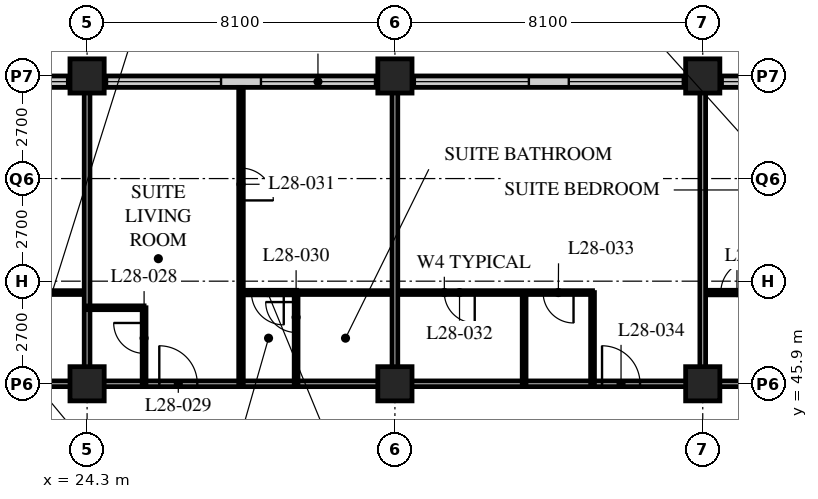
"""IFC4 building model, lengths in metres.
Left out: names, types, materials, properties, quantities, classifications, styles, units other than length and angle.
Written with IfcOpenShell. Run it as: python <this file> out.ifc"""

import sys

from ifc_helpers import new_model, si_unit, direction, frame, frame_2d, origin, origin_2d, place, context, subcontext, project, spatial, rectangle, hollow_rectangle, extrude, element, fill, save


model = new_model("IFC4")
c1 = context("Model", 3, precision=1e-05, world=origin(), true_north=direction((0.0, 1.0)))
c2 = subcontext(c1, "Body", "Model", "MODEL_VIEW")
j1 = project(units=[si_unit("LENGTHUNIT", "METRE"), si_unit("PLANEANGLEUNIT", "RADIAN")], contexts=[c1])
p1 = place(None, origin())
s1 = spatial("IfcSite", under=j1, at=p1, CompositionType="ELEMENT")
p2 = place(p1, origin())
s2 = spatial("IfcBuilding", under=s1, at=p2, CompositionType="ELEMENT")
p3 = place(p2, frame((0.0, 0.0, 113.6)))
s3 = spatial("IfcBuildingStorey", under=s2, at=p3, CompositionType="ELEMENT", Elevation=113.6)
for number, where, z_axis, x_axis in (
    (1, (24.3, 45.9, 0.0), (0.0, 0.0, 1.0), (1.0, 0.0, 0.0)),
    (2, (24.3, 54.0, 0.0), (0.0, 0.0, 1.0), (1.0, 0.0, 0.0)),
    (3, (32.4, 45.9, 0.0), (0.0, 0.0, 1.0), (1.0, 0.0, 0.0)),
    (4, (32.4, 54.0, 0.0), (0.0, 0.0, 1.0), (1.0, 0.0, 0.0)),
    (5, (40.5, 45.9, 0.0), (0.0, 0.0, 1.0), (1.0, 0.0, 0.0)),
    (6, (40.5, 54.0, 0.0), (0.0, 0.0, 1.0), (1.0, 0.0, 0.0)),
):
    element("IfcColumn", number, at=place(p3, frame(where, z_axis=z_axis, x_axis=x_axis)), inside=s3, PredefinedType="COLUMN", context=c2, shape_type="SweptSolid", body=[
        extrude(hollow_rectangle(XDim=0.9, YDim=0.9, WallThickness=0.09, at=origin_2d()), origin(), (0.0, 0.0, 1.0), 3.4),
    ])
p4 = place(p3, frame((48.3, 53.85, 0.0), z_axis=(0.0, 0.0, 1.0), x_axis=(-1.0, 0.0, 0.0)))
e7 = element("IfcWall", 7, at=p4, inside=s3, PredefinedType="SOLIDWALL", context=c2, shape_type="SweptSolid", body=[
    extrude(rectangle(XDim=40.2, YDim=0.3, at=frame_2d((20.1, 0.0))), origin(), (0.0, 0.0, 1.0), 3.19),
])
p5 = place(p4, frame((0.225, 0.0, 0.9)))
e8 = element("IfcOpeningElement", 8, at=p5, cuts=e7, PredefinedType="OPENING", context=c2, shape_type="SweptSolid", body=[
    extrude(rectangle(XDim=3.0, YDim=2.0, at=frame_2d((1.5, 1.0))), frame((0.0, 0.16, 0.0), z_axis=(0.0, -1.0, 0.0), x_axis=(1.0, 0.0, 0.0)), (0.0, 0.0, 1.0), 0.32),
])
p6 = place(p4, frame((4.275, 0.0, 0.9)))
e9 = element("IfcOpeningElement", 9, at=p6, cuts=e7, PredefinedType="OPENING", context=c2, shape_type="SweptSolid", body=[
    extrude(rectangle(XDim=3.0, YDim=2.0, at=frame_2d((1.5, 1.0))), frame((0.0, 0.16, 0.0), z_axis=(0.0, -1.0, 0.0), x_axis=(1.0, 0.0, 0.0)), (0.0, 0.0, 1.0), 0.32),
])
p7 = place(p4, frame((8.325, 0.0, 0.9)))
e10 = element("IfcOpeningElement", 10, at=p7, cuts=e7, PredefinedType="OPENING", context=c2, shape_type="SweptSolid", body=[
    extrude(rectangle(XDim=3.0, YDim=2.0, at=frame_2d((1.5, 1.0))), frame((0.0, 0.16, 0.0), z_axis=(0.0, -1.0, 0.0), x_axis=(1.0, 0.0, 0.0)), (0.0, 0.0, 1.0), 0.32),
])
p8 = place(p4, frame((12.375, 0.0, 0.9)))
e11 = element("IfcOpeningElement", 11, at=p8, cuts=e7, PredefinedType="OPENING", context=c2, shape_type="SweptSolid", body=[
    extrude(rectangle(XDim=3.0, YDim=2.0, at=frame_2d((1.5, 1.0))), frame((0.0, 0.16, 0.0), z_axis=(0.0, -1.0, 0.0), x_axis=(1.0, 0.0, 0.0)), (0.0, 0.0, 1.0), 0.32),
])
p9 = place(p4, frame((16.425, 0.0, 0.9)))
e12 = element("IfcOpeningElement", 12, at=p9, cuts=e7, PredefinedType="OPENING", context=c2, shape_type="SweptSolid", body=[
    extrude(rectangle(XDim=3.0, YDim=2.0, at=frame_2d((1.5, 1.0))), frame((0.0, 0.16, 0.0), z_axis=(0.0, -1.0, 0.0), x_axis=(1.0, 0.0, 0.0)), (0.0, 0.0, 1.0), 0.32),
])
p10 = place(p4, frame((20.475, 0.0, 0.9)))
e13 = element("IfcOpeningElement", 13, at=p10, cuts=e7, PredefinedType="OPENING", context=c2, shape_type="SweptSolid", body=[
    extrude(rectangle(XDim=3.0, YDim=2.0, at=frame_2d((1.5, 1.0))), frame((0.0, 0.16, 0.0), z_axis=(0.0, -1.0, 0.0), x_axis=(1.0, 0.0, 0.0)), (0.0, 0.0, 1.0), 0.32),
])
p11 = place(p4, frame((24.525, 0.0, 0.9)))
e14 = element("IfcOpeningElement", 14, at=p11, cuts=e7, PredefinedType="OPENING", context=c2, shape_type="SweptSolid", body=[
    extrude(rectangle(XDim=3.0, YDim=2.0, at=frame_2d((1.5, 1.0))), frame((0.0, 0.16, 0.0), z_axis=(0.0, -1.0, 0.0), x_axis=(1.0, 0.0, 0.0)), (0.0, 0.0, 1.0), 0.32),
])
p12 = place(p4, frame((28.575, 0.0, 0.9)))
e15 = element("IfcOpeningElement", 15, at=p12, cuts=e7, PredefinedType="OPENING", context=c2, shape_type="SweptSolid", body=[
    extrude(rectangle(XDim=3.0, YDim=2.0, at=frame_2d((1.5, 1.0))), frame((0.0, 0.16, 0.0), z_axis=(0.0, -1.0, 0.0), x_axis=(1.0, 0.0, 0.0)), (0.0, 0.0, 1.0), 0.32),
])
p13 = place(p4, frame((32.625, 0.0, 0.9)))
e16 = element("IfcOpeningElement", 16, at=p13, cuts=e7, PredefinedType="OPENING", context=c2, shape_type="SweptSolid", body=[
    extrude(rectangle(XDim=3.0, YDim=2.0, at=frame_2d((1.5, 1.0))), frame((0.0, 0.16, 0.0), z_axis=(0.0, -1.0, 0.0), x_axis=(1.0, 0.0, 0.0)), (0.0, 0.0, 1.0), 0.32),
])
p14 = place(p4, frame((36.675, 0.0, 0.9)))
e17 = element("IfcOpeningElement", 17, at=p14, cuts=e7, PredefinedType="OPENING", context=c2, shape_type="SweptSolid", body=[
    extrude(rectangle(XDim=3.0, YDim=2.0, at=frame_2d((1.5, 1.0))), frame((0.0, 0.16, 0.0), z_axis=(0.0, -1.0, 0.0), x_axis=(1.0, 0.0, 0.0)), (0.0, 0.0, 1.0), 0.32),
])
p15 = place(p3, frame((12.15, 45.9, 0.0), z_axis=(0.0, 0.0, 1.0), x_axis=(1.0, 0.0, 0.0)))
e18 = element("IfcWall", 18, at=p15, inside=s3, PredefinedType="PARTITIONING", context=c2, shape_type="SweptSolid", body=[
    extrude(rectangle(XDim=32.4, YDim=0.15, at=frame_2d((16.2, 0.0))), origin(), (0.0, 0.0, 1.0), 2.578),
])
p16 = place(p15, frame((5.95, 0.0, 0.0)))
e19 = element("IfcOpeningElement", 19, at=p16, cuts=e18, PredefinedType="OPENING", context=c2, shape_type="SweptSolid", body=[
    extrude(rectangle(XDim=1.0, YDim=2.1, at=frame_2d((0.5, 1.05))), frame((0.0, 0.085, 0.0), z_axis=(0.0, -1.0, 0.0), x_axis=(1.0, 0.0, 0.0)), (0.0, 0.0, 1.0), 0.17),
])
p17 = place(p15, frame((14.05, 0.0, 0.0)))
e20 = element("IfcOpeningElement", 20, at=p17, cuts=e18, PredefinedType="OPENING", context=c2, shape_type="SweptSolid", body=[
    extrude(rectangle(XDim=1.0, YDim=2.1, at=frame_2d((0.5, 1.05))), frame((0.0, 0.085, 0.0), z_axis=(0.0, -1.0, 0.0), x_axis=(1.0, 0.0, 0.0)), (0.0, 0.0, 1.0), 0.17),
])
p18 = place(p15, frame((25.7, 0.0, 0.0)))
e21 = element("IfcOpeningElement", 21, at=p18, cuts=e18, PredefinedType="OPENING", context=c2, shape_type="SweptSolid", body=[
    extrude(rectangle(XDim=1.0, YDim=2.1, at=frame_2d((0.5, 1.05))), frame((0.0, 0.085, 0.0), z_axis=(0.0, -1.0, 0.0), x_axis=(1.0, 0.0, 0.0)), (0.0, 0.0, 1.0), 0.17),
])
p19 = place(p15, frame((29.875, 0.0, 0.0)))
e22 = element("IfcOpeningElement", 22, at=p19, cuts=e18, PredefinedType="OPENING", context=c2, shape_type="SweptSolid", body=[
    extrude(rectangle(XDim=1.0, YDim=2.1, at=frame_2d((0.5, 1.05))), frame((0.0, 0.085, 0.0), z_axis=(0.0, -1.0, 0.0), x_axis=(1.0, 0.0, 0.0)), (0.0, 0.0, 1.0), 0.17),
])
p20 = place(p15, frame((1.525, 0.0, 0.0)))
e23 = element("IfcOpeningElement", 23, at=p20, cuts=e18, PredefinedType="OPENING", context=c2, shape_type="SweptSolid", body=[
    extrude(rectangle(XDim=1.0, YDim=2.1, at=frame_2d((0.5, 1.05))), frame((0.0, 0.085, 0.0), z_axis=(0.0, -1.0, 0.0), x_axis=(1.0, 0.0, 0.0)), (0.0, 0.0, 1.0), 0.17),
])
p21 = place(p3, frame((21.7, 48.3, 0.0), z_axis=(0.0, 0.0, 1.0), x_axis=(1.0, 0.0, 0.0)))
e24 = element("IfcWall", 24, at=p21, inside=s3, PredefinedType="PARTITIONING", context=c2, shape_type="SweptSolid", body=[
    extrude(rectangle(XDim=2.6, YDim=0.1, at=frame_2d((1.3, 0.0))), origin(), (0.0, 0.0, 1.0), 3.19),
])
p22 = place(p3, frame((24.3, 45.9, 0.0), z_axis=(0.0, 0.0, 1.0), x_axis=(0.0, 1.0, 0.0)))
e25 = element("IfcWall", 25, at=p22, inside=s3, PredefinedType="PARTITIONING", context=c2, shape_type="SweptSolid", body=[
    extrude(rectangle(XDim=7.8, YDim=0.15, at=frame_2d((3.9, 0.0))), origin(), (0.0, 0.0, 1.0), 2.578),
])
p23 = place(p3, frame((24.3, 47.9, 0.0), z_axis=(0.0, 0.0, 1.0), x_axis=(1.0, 0.0, 0.0)))
e26 = element("IfcWall", 26, at=p23, inside=s3, PredefinedType="PARTITIONING", context=c2, shape_type="SweptSolid", body=[
    extrude(rectangle(XDim=1.5, YDim=0.1, at=frame_2d((0.75, 0.0))), origin(), (0.0, 0.0, 1.0), 3.19),
])
p24 = place(p3, frame((25.8, 45.9, 0.0), z_axis=(0.0, 0.0, 1.0), x_axis=(0.0, 1.0, 0.0)))
e27 = element("IfcWall", 27, at=p24, inside=s3, PredefinedType="PARTITIONING", context=c2, shape_type="SweptSolid", body=[
    extrude(rectangle(XDim=2.0, YDim=0.1, at=frame_2d((1.0, 0.0))), origin(), (0.0, 0.0, 1.0), 3.19),
])
p25 = place(p24, frame((0.8, 0.0, 0.0)))
e28 = element("IfcOpeningElement", 28, at=p25, cuts=e27, PredefinedType="OPENING", context=c2, shape_type="SweptSolid", body=[
    extrude(rectangle(XDim=0.8, YDim=2.1, at=frame_2d((0.4, 1.05))), frame((0.0, 0.06, 0.0), z_axis=(0.0, -1.0, 0.0), x_axis=(1.0, 0.0, 0.0)), (0.0, 0.0, 1.0), 0.12),
])
p26 = place(p3, frame((29.8, 48.3, 0.0), z_axis=(0.0, 0.0, 1.0), x_axis=(1.0, 0.0, 0.0)))
e29 = element("IfcWall", 29, at=p26, inside=s3, PredefinedType="PARTITIONING", context=c2, shape_type="SweptSolid", body=[
    extrude(rectangle(XDim=7.8, YDim=0.1, at=frame_2d((3.9, 0.0))), origin(), (0.0, 0.0, 1.0), 3.19),
])
p27 = place(p26, frame((3.9, 0.0, 0.0)))
e30 = element("IfcOpeningElement", 30, at=p27, cuts=e29, PredefinedType="OPENING", context=c2, shape_type="SweptSolid", body=[
    extrude(rectangle(XDim=0.8, YDim=2.1, at=frame_2d((0.4, 1.05))), frame((0.0, 0.06, 0.0), z_axis=(0.0, -1.0, 0.0), x_axis=(1.0, 0.0, 0.0)), (0.0, 0.0, 1.0), 0.12),
])
p28 = place(p26, frame((6.5, 0.0, 0.0)))
e31 = element("IfcOpeningElement", 31, at=p28, cuts=e29, PredefinedType="OPENING", context=c2, shape_type="SweptSolid", body=[
    extrude(rectangle(XDim=0.8, YDim=2.1, at=frame_2d((0.4, 1.05))), frame((0.0, 0.06, 0.0), z_axis=(0.0, -1.0, 0.0), x_axis=(1.0, 0.0, 0.0)), (0.0, 0.0, 1.0), 0.12),
])
p29 = place(p3, frame((29.8, 45.9, 0.0), z_axis=(0.0, 0.0, 1.0), x_axis=(0.0, 1.0, 0.0)))
e32 = element("IfcWall", 32, at=p29, inside=s3, PredefinedType="PARTITIONING", context=c2, shape_type="SweptSolid", body=[
    extrude(rectangle(XDim=2.4, YDim=0.1, at=frame_2d((1.2, 0.0))), origin(), (0.0, 0.0, 1.0), 3.19),
])
p30 = place(p29, frame((1.35, 0.0, 0.0)))
e33 = element("IfcOpeningElement", 33, at=p30, cuts=e32, PredefinedType="OPENING", context=c2, shape_type="SweptSolid", body=[
    extrude(rectangle(XDim=0.8, YDim=2.1, at=frame_2d((0.4, 1.05))), frame((0.0, 0.06, 0.0), z_axis=(0.0, -1.0, 0.0), x_axis=(1.0, 0.0, 0.0)), (0.0, 0.0, 1.0), 0.12),
])
p31 = place(p3, frame((28.35, 45.9, 0.0), z_axis=(0.0, 0.0, 1.0), x_axis=(0.0, 1.0, 0.0)))
e34 = element("IfcWall", 34, at=p31, inside=s3, PredefinedType="PARTITIONING", context=c2, shape_type="SweptSolid", body=[
    extrude(rectangle(XDim=7.8, YDim=0.12, at=frame_2d((3.9, 0.0))), origin(), (0.0, 0.0, 1.0), 3.19),
])
p32 = place(p31, frame((4.825, 0.0, 0.0)))
e35 = element("IfcOpeningElement", 35, at=p32, cuts=e34, PredefinedType="OPENING", context=c2, shape_type="SweptSolid", body=[
    extrude(rectangle(XDim=0.85, YDim=2.1, at=frame_2d((0.425, 1.05))), frame((0.0, 0.07, 0.0), z_axis=(0.0, -1.0, 0.0), x_axis=(1.0, 0.0, 0.0)), (0.0, 0.0, 1.0), 0.14),
])
p33 = place(p3, frame((32.4, 45.9, 0.0), z_axis=(0.0, 0.0, 1.0), x_axis=(0.0, 1.0, 0.0)))
e36 = element("IfcWall", 36, at=p33, inside=s3, PredefinedType="PARTITIONING", context=c2, shape_type="SweptSolid", body=[
    extrude(rectangle(XDim=7.8, YDim=0.15, at=frame_2d((3.9, 0.0))), origin(), (0.0, 0.0, 1.0), 2.578),
])
for number, where, z_axis, x_axis in (
    (37, (35.8, 45.9, 0.0), (0.0, 0.0, 1.0), (0.0, 1.0, 0.0)),
    (38, (37.6, 45.9, 0.0), (0.0, 0.0, 1.0), (0.0, 1.0, 0.0)),
):
    element("IfcWall", number, at=place(p3, frame(where, z_axis=z_axis, x_axis=x_axis)), inside=s3, PredefinedType="PARTITIONING", context=c2, shape_type="SweptSolid", body=[
        extrude(rectangle(XDim=2.4, YDim=0.1, at=frame_2d((1.2, 0.0))), origin(), (0.0, 0.0, 1.0), 3.19),
    ])
p34 = place(p3, frame((40.5, 48.3, 0.0), z_axis=(0.0, 0.0, 1.0), x_axis=(1.0, 0.0, 0.0)))
e39 = element("IfcWall", 39, at=p34, inside=s3, PredefinedType="PARTITIONING", context=c2, shape_type="SweptSolid", body=[
    extrude(rectangle(XDim=8.05, YDim=0.12, at=frame_2d((4.025, 0.0))), origin(), (0.0, 0.0, 1.0), 3.19),
])
p35 = place(p34, frame((0.475, 0.0, 0.0)))
e40 = element("IfcOpeningElement", 40, at=p35, cuts=e39, PredefinedType="OPENING", context=c2, shape_type="SweptSolid", body=[
    extrude(rectangle(XDim=0.85, YDim=2.1, at=frame_2d((0.425, 1.05))), frame((0.0, 0.07, 0.0), z_axis=(0.0, -1.0, 0.0), x_axis=(1.0, 0.0, 0.0)), (0.0, 0.0, 1.0), 0.14),
])
p36 = place(p34, frame((4.325, 0.0, 0.0)))
e41 = element("IfcOpeningElement", 41, at=p36, cuts=e39, PredefinedType="OPENING", context=c2, shape_type="SweptSolid", body=[
    extrude(rectangle(XDim=0.85, YDim=2.1, at=frame_2d((0.425, 1.05))), frame((0.0, 0.07, 0.0), z_axis=(0.0, -1.0, 0.0), x_axis=(1.0, 0.0, 0.0)), (0.0, 0.0, 1.0), 0.14),
])
p37 = place(p3, frame((40.5, 45.9, 0.0), z_axis=(0.0, 0.0, 1.0), x_axis=(0.0, 1.0, 0.0)))
e42 = element("IfcWall", 42, at=p37, inside=s3, PredefinedType="PARTITIONING", context=c2, shape_type="SweptSolid", body=[
    extrude(rectangle(XDim=7.8, YDim=0.15, at=frame_2d((3.9, 0.0))), origin(), (0.0, 0.0, 1.0), 2.578),
])
p38 = place(p3, frame((28.35, 48.3, 0.0), z_axis=(0.0, 0.0, 1.0), x_axis=(1.0, 0.0, 0.0)))
e43 = element("IfcWall", 43, at=p38, inside=s3, PredefinedType="PARTITIONING", context=c2, shape_type="SweptSolid", body=[
    extrude(rectangle(XDim=1.46, YDim=0.12, at=frame_2d((0.73, 0.0))), origin(), (0.0, 0.0, 1.0), 3.19),
])
p39 = place(p38, frame((0.275, 0.0, 0.0)))
e44 = element("IfcOpeningElement", 44, at=p39, cuts=e43, PredefinedType="OPENING", context=c2, shape_type="SweptSolid", body=[
    extrude(rectangle(XDim=0.85, YDim=2.1, at=frame_2d((0.425, 1.05))), frame((0.0, 0.07, 0.0), z_axis=(0.0, -1.0, 0.0), x_axis=(1.0, 0.0, 0.0)), (0.0, 0.0, 1.0), 0.14),
])
p40 = place(p6, origin())
e45 = element("IfcWindow", 45, at=p40, inside=s3, PartitioningType="SINGLE_PANEL", PredefinedType="WINDOW", context=c2, shape_type="SweptSolid", body=[
    extrude(rectangle(XDim=3.0, YDim=2.0, at=frame_2d((1.5, 1.0))), frame((0.0, 0.03, 0.0), z_axis=(0.0, -1.0, 0.0), x_axis=(1.0, 0.0, 0.0)), (0.0, 0.0, 1.0), 0.06),
])
fill(e9, e45)
p41 = place(p7, origin())
e46 = element("IfcWindow", 46, at=p41, inside=s3, PartitioningType="SINGLE_PANEL", PredefinedType="WINDOW", context=c2, shape_type="SweptSolid", body=[
    extrude(rectangle(XDim=3.0, YDim=2.0, at=frame_2d((1.5, 1.0))), frame((0.0, 0.03, 0.0), z_axis=(0.0, -1.0, 0.0), x_axis=(1.0, 0.0, 0.0)), (0.0, 0.0, 1.0), 0.06),
])
fill(e10, e46)
p42 = place(p8, origin())
e47 = element("IfcWindow", 47, at=p42, inside=s3, PartitioningType="SINGLE_PANEL", PredefinedType="WINDOW", context=c2, shape_type="SweptSolid", body=[
    extrude(rectangle(XDim=3.0, YDim=2.0, at=frame_2d((1.5, 1.0))), frame((0.0, 0.03, 0.0), z_axis=(0.0, -1.0, 0.0), x_axis=(1.0, 0.0, 0.0)), (0.0, 0.0, 1.0), 0.06),
])
fill(e11, e47)
p43 = place(p9, origin())
e48 = element("IfcWindow", 48, at=p43, inside=s3, PartitioningType="SINGLE_PANEL", PredefinedType="WINDOW", context=c2, shape_type="SweptSolid", body=[
    extrude(rectangle(XDim=3.0, YDim=2.0, at=frame_2d((1.5, 1.0))), frame((0.0, 0.03, 0.0), z_axis=(0.0, -1.0, 0.0), x_axis=(1.0, 0.0, 0.0)), (0.0, 0.0, 1.0), 0.06),
])
fill(e12, e48)
p44 = place(p10, origin())
e49 = element("IfcWindow", 49, at=p44, inside=s3, PartitioningType="SINGLE_PANEL", PredefinedType="WINDOW", context=c2, shape_type="SweptSolid", body=[
    extrude(rectangle(XDim=3.0, YDim=2.0, at=frame_2d((1.5, 1.0))), frame((0.0, 0.03, 0.0), z_axis=(0.0, -1.0, 0.0), x_axis=(1.0, 0.0, 0.0)), (0.0, 0.0, 1.0), 0.06),
])
fill(e13, e49)
p45 = place(p11, origin())
e50 = element("IfcWindow", 50, at=p45, inside=s3, PartitioningType="SINGLE_PANEL", PredefinedType="WINDOW", context=c2, shape_type="SweptSolid", body=[
    extrude(rectangle(XDim=3.0, YDim=2.0, at=frame_2d((1.5, 1.0))), frame((0.0, 0.03, 0.0), z_axis=(0.0, -1.0, 0.0), x_axis=(1.0, 0.0, 0.0)), (0.0, 0.0, 1.0), 0.06),
])
fill(e14, e50)
p46 = place(p25, origin())
e51 = element("IfcDoor", 51, at=p46, inside=s3, OperationType="SINGLE_SWING_RIGHT", PredefinedType="DOOR", context=c2, shape_type="SweptSolid", body=[
    extrude(rectangle(XDim=0.8, YDim=2.1, at=frame_2d((0.4, 1.05))), frame((0.0, 0.025, 0.0), z_axis=(0.0, -1.0, 0.0), x_axis=(1.0, 0.0, 0.0)), (0.0, 0.0, 1.0), 0.05),
])
fill(e28, e51)
p47 = place(p17, origin())
e52 = element("IfcDoor", 52, at=p47, inside=s3, OperationType="SINGLE_SWING_LEFT", PredefinedType="DOOR", context=c2, shape_type="SweptSolid", body=[
    extrude(rectangle(XDim=1.0, YDim=2.1, at=frame_2d((0.5, 1.05))), frame((0.0, 0.025, 0.0), z_axis=(0.0, -1.0, 0.0), x_axis=(1.0, 0.0, 0.0)), (0.0, 0.0, 1.0), 0.05),
])
fill(e20, e52)
p48 = place(p30, origin())
e53 = element("IfcDoor", 53, at=p48, inside=s3, OperationType="SINGLE_SWING_RIGHT", PredefinedType="DOOR", context=c2, shape_type="SweptSolid", body=[
    extrude(rectangle(XDim=0.8, YDim=2.1, at=frame_2d((0.4, 1.05))), frame((0.0, 0.025, 0.0), z_axis=(0.0, -1.0, 0.0), x_axis=(1.0, 0.0, 0.0)), (0.0, 0.0, 1.0), 0.05),
])
fill(e33, e53)
p49 = place(p32, origin())
e54 = element("IfcDoor", 54, at=p49, inside=s3, OperationType="SINGLE_SWING_RIGHT", PredefinedType="DOOR", context=c2, shape_type="SweptSolid", body=[
    extrude(rectangle(XDim=0.85, YDim=2.1, at=frame_2d((0.425, 1.05))), frame((0.0, 0.025, 0.0), z_axis=(0.0, -1.0, 0.0), x_axis=(1.0, 0.0, 0.0)), (0.0, 0.0, 1.0), 0.05),
])
fill(e35, e54)
p50 = place(p27, origin())
e55 = element("IfcDoor", 55, at=p50, inside=s3, OperationType="SINGLE_SWING_LEFT", PredefinedType="DOOR", context=c2, shape_type="SweptSolid", body=[
    extrude(rectangle(XDim=0.8, YDim=2.1, at=frame_2d((0.4, 1.05))), frame((0.0, 0.025, 0.0), z_axis=(0.0, -1.0, 0.0), x_axis=(1.0, 0.0, 0.0)), (0.0, 0.0, 1.0), 0.05),
])
fill(e30, e55)
p51 = place(p28, origin())
e56 = element("IfcDoor", 56, at=p51, inside=s3, OperationType="SINGLE_SWING_LEFT", PredefinedType="DOOR", context=c2, shape_type="SweptSolid", body=[
    extrude(rectangle(XDim=0.8, YDim=2.1, at=frame_2d((0.4, 1.05))), frame((0.0, 0.025, 0.0), z_axis=(0.0, -1.0, 0.0), x_axis=(1.0, 0.0, 0.0)), (0.0, 0.0, 1.0), 0.05),
])
fill(e31, e56)
p52 = place(p18, origin())
e57 = element("IfcDoor", 57, at=p52, inside=s3, OperationType="SINGLE_SWING_LEFT", PredefinedType="DOOR", context=c2, shape_type="SweptSolid", body=[
    extrude(rectangle(XDim=1.0, YDim=2.1, at=frame_2d((0.5, 1.05))), frame((0.0, 0.025, 0.0), z_axis=(0.0, -1.0, 0.0), x_axis=(1.0, 0.0, 0.0)), (0.0, 0.0, 1.0), 0.05),
])
fill(e21, e57)
p53 = place(p35, origin())
e58 = element("IfcDoor", 58, at=p53, inside=s3, OperationType="SINGLE_SWING_RIGHT", PredefinedType="DOOR", context=c2, shape_type="SweptSolid", body=[
    extrude(rectangle(XDim=0.85, YDim=2.1, at=frame_2d((0.425, 1.05))), frame((0.0, 0.025, 0.0), z_axis=(0.0, -1.0, 0.0), x_axis=(1.0, 0.0, 0.0)), (0.0, 0.0, 1.0), 0.05),
])
fill(e40, e58)
p54 = place(p39, origin())
e59 = element("IfcDoor", 59, at=p54, inside=s3, OperationType="SINGLE_SWING_LEFT", PredefinedType="DOOR", context=c2, shape_type="SweptSolid", body=[
    extrude(rectangle(XDim=0.85, YDim=2.1, at=frame_2d((0.425, 1.05))), frame((0.0, 0.025, 0.0), z_axis=(0.0, -1.0, 0.0), x_axis=(1.0, 0.0, 0.0)), (0.0, 0.0, 1.0), 0.05),
])
fill(e44, e59)
save(model, sys.argv[1])
